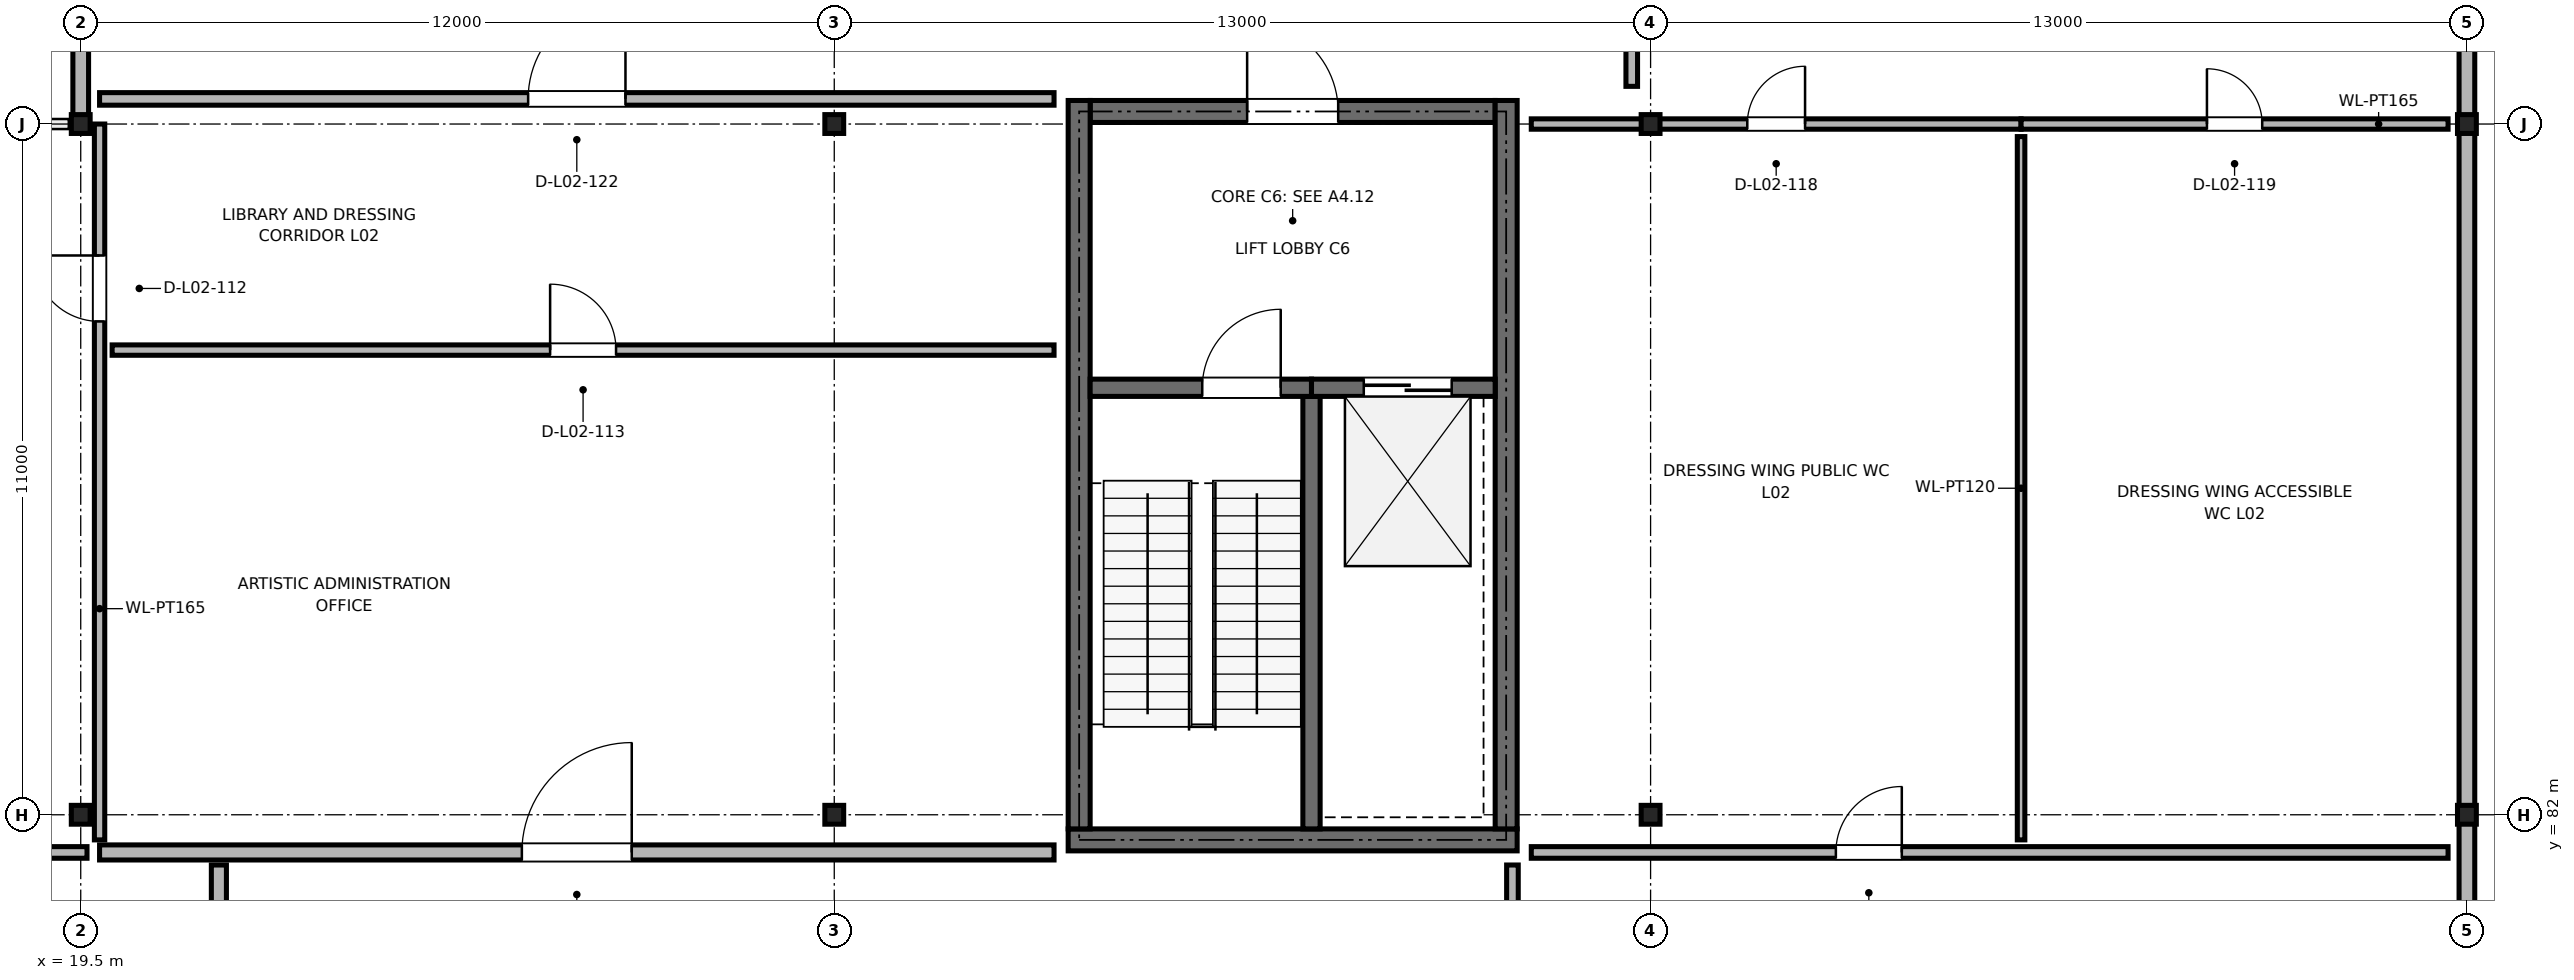
"""IFC4 building model, lengths in metres.
Left out: names, types, materials, properties, quantities, classifications, styles, units other than length and angle.
Written with IfcOpenShell. Run it as: python <this file> out.ifc"""

import sys

from ifc_helpers import new_model, si_unit, direction, frame, frame_2d, origin, origin_2d, place, context, subcontext, project, spatial, rectangle, i_section, extrude, element, fill, save


model = new_model("IFC4")
c1 = context("Model", 3, precision=1e-05, world=origin(), true_north=direction((0.0, 1.0)))
c2 = subcontext(c1, "Body", "Model", "MODEL_VIEW")
j1 = project(units=[si_unit("LENGTHUNIT", "METRE"), si_unit("PLANEANGLEUNIT", "RADIAN")], contexts=[c1])
p1 = place(None, origin())
s1 = spatial("IfcSite", under=j1, at=p1, CompositionType="ELEMENT")
p2 = place(p1, origin())
s2 = spatial("IfcBuilding", under=s1, at=p2, CompositionType="ELEMENT")
p3 = place(p2, frame((0.0, 0.0, 9.6)))
s3 = spatial("IfcBuildingStorey", under=s2, at=p3, CompositionType="ELEMENT", Elevation=9.6)
for number, where, z_axis, x_axis in (
    (1, (19.5, 82.0, 0.0), (0.0, 0.0, 1.0), (1.0, 0.0, 0.0)),
    (2, (19.5, 93.0, 0.0), (0.0, 0.0, 1.0), (1.0, 0.0, 0.0)),
    (3, (31.5, 82.0, 0.0), (0.0, 0.0, 1.0), (1.0, 0.0, 0.0)),
    (4, (31.5, 93.0, 0.0), (0.0, 0.0, 1.0), (1.0, 0.0, 0.0)),
    (5, (44.5, 82.0, 0.0), (0.0, 0.0, 1.0), (1.0, 0.0, 0.0)),
    (6, (44.5, 93.0, 0.0), (0.0, 0.0, 1.0), (1.0, 0.0, 0.0)),
    (7, (57.5, 82.0, 0.0), (0.0, 0.0, 1.0), (1.0, 0.0, 0.0)),
    (8, (57.5, 93.0, 0.0), (0.0, 0.0, 1.0), (1.0, 0.0, 0.0)),
):
    element("IfcColumn", number, at=place(p3, frame(where, z_axis=z_axis, x_axis=x_axis)), inside=s3, PredefinedType="COLUMN", context=c2, shape_type="SweptSolid", body=[
        extrude(i_section(OverallWidth=0.3, OverallDepth=0.3, WebThickness=0.011, FlangeThickness=0.019, FilletRadius=0.027, at=origin_2d()), origin(), (0.0, 0.0, 1.0), 4.8),
    ])
p4 = place(p3, frame((57.5, 81.98, 0.0), z_axis=(0.0, 0.0, 1.0), x_axis=(0.0, -1.0, 0.0)))
e9 = element("IfcWall", 9, at=p4, inside=s3, PredefinedType="SOLIDWALL", context=c2, shape_type="SweptSolid", body=[
    extrude(rectangle(XDim=10.96, YDim=0.25, at=frame_2d((5.48, 0.0))), origin(), (0.0, 0.0, 1.0), 4.028),
])
p5 = place(p4, frame((4.73, 0.0, 0.9)))
e10 = element("IfcOpeningElement", 10, at=p5, cuts=e9, PredefinedType="OPENING", context=c2, shape_type="SweptSolid", body=[
    extrude(rectangle(XDim=1.5, YDim=1.55, at=frame_2d((0.75, 0.775))), frame((0.0, 0.135, 0.0), z_axis=(0.0, -1.0, 0.0), x_axis=(1.0, 0.0, 0.0)), (0.0, 0.0, 1.0), 0.27),
])
p6 = place(p3, frame((57.5, 92.98, 0.0), z_axis=(0.0, 0.0, 1.0), x_axis=(0.0, -1.0, 0.0)))
e11 = element("IfcWall", 11, at=p6, inside=s3, PredefinedType="SOLIDWALL", context=c2, shape_type="SweptSolid", body=[
    extrude(rectangle(XDim=10.96, YDim=0.25, at=frame_2d((5.48, 0.0))), origin(), (0.0, 0.0, 1.0), 4.028),
])
p7 = place(p3, frame((57.5, 103.98, 0.0), z_axis=(0.0, 0.0, 1.0), x_axis=(0.0, -1.0, 0.0)))
e12 = element("IfcWall", 12, at=p7, inside=s3, PredefinedType="SOLIDWALL", context=c2, shape_type="SweptSolid", body=[
    extrude(rectangle(XDim=10.96, YDim=0.25, at=frame_2d((5.48, 0.0))), origin(), (0.0, 0.0, 1.0), 4.19),
])
p8 = place(p7, frame((4.655, 0.0, 0.9)))
e13 = element("IfcOpeningElement", 13, at=p8, cuts=e12, PredefinedType="OPENING", context=c2, shape_type="SweptSolid", body=[
    extrude(rectangle(XDim=1.65, YDim=1.55, at=frame_2d((0.825, 0.775))), frame((0.0, 0.135, 0.0), z_axis=(0.0, -1.0, 0.0), x_axis=(1.0, 0.0, 0.0)), (0.0, 0.0, 1.0), 0.27),
])
p9 = place(p3, frame((19.5, 93.02, 0.0), z_axis=(0.0, 0.0, 1.0), x_axis=(0.0, 1.0, 0.0)))
e14 = element("IfcWall", 14, at=p9, inside=s3, PredefinedType="SOLIDWALL", context=c2, shape_type="SweptSolid", body=[
    extrude(rectangle(XDim=10.96, YDim=0.25, at=frame_2d((5.48, 0.0))), origin(), (0.0, 0.0, 1.0), 4.088),
])
p10 = place(p9, frame((4.88, 0.0, 0.85)))
e15 = element("IfcOpeningElement", 15, at=p10, cuts=e14, PredefinedType="OPENING", context=c2, shape_type="SweptSolid", body=[
    extrude(rectangle(XDim=1.2, YDim=1.7, at=frame_2d((0.6, 0.85))), frame((0.0, 0.135, 0.0), z_axis=(0.0, -1.0, 0.0), x_axis=(1.0, 0.0, 0.0)), (0.0, 0.0, 1.0), 0.27),
])
p11 = place(p3, frame((35.225, 81.6, 0.0), z_axis=(0.0, 0.0, 1.0), x_axis=(1.0, 0.0, 0.0)))
e16 = element("IfcWall", 16, at=p11, inside=s3, PredefinedType="SHEAR", context=c2, shape_type="SweptSolid", body=[
    extrude(rectangle(XDim=7.15, YDim=0.35, at=frame_2d((3.575, 0.0))), origin(), (0.0, 0.0, 1.0), 4.55),
])
p12 = place(p3, frame((35.575, 93.2, 0.0), z_axis=(0.0, 0.0, 1.0), x_axis=(1.0, 0.0, 0.0)))
e17 = element("IfcWall", 17, at=p12, inside=s3, PredefinedType="SHEAR", context=c2, shape_type="SweptSolid", body=[
    extrude(rectangle(XDim=6.45, YDim=0.35, at=frame_2d((3.225, 0.0))), origin(), (0.0, 0.0, 1.0), 4.55),
])
p13 = place(p12, frame((2.5, 0.0, 0.0)))
e18 = element("IfcOpeningElement", 18, at=p13, cuts=e17, PredefinedType="OPENING", context=c2, shape_type="SweptSolid", body=[
    extrude(rectangle(XDim=1.45, YDim=2.2, at=frame_2d((0.725, 1.1))), frame((0.0, 0.185, 0.0), z_axis=(0.0, -1.0, 0.0), x_axis=(1.0, 0.0, 0.0)), (0.0, 0.0, 1.0), 0.37),
])
for number, where, z_axis, x_axis in (
    (19, (35.4, 81.775, 0.0), (0.0, 0.0, 1.0), (0.0, 1.0, 0.0)),
    (20, (42.2, 81.775, 0.0), (0.0, 0.0, 1.0), (0.0, 1.0, 0.0)),
):
    element("IfcWall", number, at=place(p3, frame(where, z_axis=z_axis, x_axis=x_axis)), inside=s3, PredefinedType="SHEAR", context=c2, shape_type="SweptSolid", body=[
        extrude(rectangle(XDim=11.6, YDim=0.35, at=frame_2d((5.8, 0.0))), origin(), (0.0, 0.0, 1.0), 4.55),
    ])
p14 = place(p3, frame((39.1, 81.775, 0.0), z_axis=(0.0, 0.0, 1.0), x_axis=(0.0, 1.0, 0.0)))
e21 = element("IfcWall", 21, at=p14, inside=s3, PredefinedType="SHEAR", context=c2, shape_type="SweptSolid", body=[
    extrude(rectangle(XDim=6.888, YDim=0.275, at=frame_2d((3.444, 0.0))), origin(), (0.0, 0.0, 1.0), 4.55),
])
p15 = place(p3, frame((35.575, 88.8, 0.0), z_axis=(0.0, 0.0, 1.0), x_axis=(1.0, 0.0, 0.0)))
e22 = element("IfcWall", 22, at=p15, inside=s3, PredefinedType="SHEAR", context=c2, shape_type="SweptSolid", body=[
    extrude(rectangle(XDim=3.525, YDim=0.275, at=frame_2d((1.763, 0.0))), origin(), (0.0, 0.0, 1.0), 4.55),
])
p16 = place(p15, frame((1.785, 0.0, 0.0)))
e23 = element("IfcOpeningElement", 23, at=p16, cuts=e22, PredefinedType="OPENING", context=c2, shape_type="SweptSolid", body=[
    extrude(rectangle(XDim=1.25, YDim=2.15, at=frame_2d((0.625, 1.075))), frame((0.0, 0.147, 0.0), z_axis=(0.0, -1.0, 0.0), x_axis=(1.0, 0.0, 0.0)), (0.0, 0.0, 1.0), 0.295),
])
p17 = place(p3, frame((39.1, 88.8, 0.0), z_axis=(0.0, 0.0, 1.0), x_axis=(1.0, 0.0, 0.0)))
e24 = element("IfcWall", 24, at=p17, inside=s3, PredefinedType="SHEAR", context=c2, shape_type="SweptSolid", body=[
    extrude(rectangle(XDim=2.925, YDim=0.275, at=frame_2d((1.462, 0.0))), origin(), (0.0, 0.0, 1.0), 4.55),
])
p18 = place(p17, frame((0.833, 0.0, 0.0)))
e25 = element("IfcOpeningElement", 25, at=p18, cuts=e24, PredefinedType="OPENING", context=c2, shape_type="SweptSolid", body=[
    extrude(rectangle(XDim=1.4, YDim=2.2, at=frame_2d((0.7, 1.1))), frame((0.0, 0.147, 0.0), z_axis=(0.0, -1.0, 0.0), x_axis=(1.0, 0.0, 0.0)), (0.0, 0.0, 1.0), 0.295),
])
p19 = place(p3, frame((19.8, 81.4, 0.0), z_axis=(0.0, 0.0, 1.0), x_axis=(1.0, 0.0, 0.0)))
e26 = element("IfcWall", 26, at=p19, inside=s3, PredefinedType="PARTITIONING", context=c2, shape_type="SweptSolid", body=[
    extrude(rectangle(XDim=15.2, YDim=0.24, at=frame_2d((7.6, 0.0))), origin(), (0.0, 0.0, 1.0), 3.89),
])
p20 = place(p19, frame((6.725, 0.0, 0.0)))
e27 = element("IfcOpeningElement", 27, at=p20, cuts=e26, PredefinedType="OPENING", context=c2, shape_type="SweptSolid", body=[
    extrude(rectangle(XDim=1.75, YDim=2.25, at=frame_2d((0.875, 1.125))), frame((0.0, 0.13, 0.0), z_axis=(0.0, -1.0, 0.0), x_axis=(1.0, 0.0, 0.0)), (0.0, 0.0, 1.0), 0.26),
])
p21 = place(p3, frame((7.8, 81.4, 0.0), z_axis=(0.0, 0.0, 1.0), x_axis=(1.0, 0.0, 0.0)))
e28 = element("IfcWall", 28, at=p21, inside=s3, PredefinedType="PARTITIONING", context=c2, shape_type="SweptSolid", body=[
    extrude(rectangle(XDim=11.8, YDim=0.185, at=frame_2d((5.9, 0.0))), origin(), (0.0, 0.0, 1.0), 4.09),
])
p22 = place(p21, frame((5.375, 0.0, 0.0)))
e29 = element("IfcOpeningElement", 29, at=p22, cuts=e28, PredefinedType="OPENING", context=c2, shape_type="SweptSolid", body=[
    extrude(rectangle(XDim=1.05, YDim=2.15, at=frame_2d((0.525, 1.075))), frame((0.0, 0.103, 0.0), z_axis=(0.0, -1.0, 0.0), x_axis=(1.0, 0.0, 0.0)), (0.0, 0.0, 1.0), 0.205),
])
p23 = place(p3, frame((19.8, 81.6, 0.0), z_axis=(0.0, 0.0, 1.0), x_axis=(0.0, 1.0, 0.0)))
e30 = element("IfcWall", 30, at=p23, inside=s3, PredefinedType="PARTITIONING", context=c2, shape_type="SweptSolid", body=[
    extrude(rectangle(XDim=11.4, YDim=0.165, at=frame_2d((5.7, 0.0))), origin(), (0.0, 0.0, 1.0), 4.09),
])
p24 = place(p23, frame((8.257, 0.0, 0.0)))
e31 = element("IfcOpeningElement", 31, at=p24, cuts=e30, PredefinedType="OPENING", context=c2, shape_type="SweptSolid", body=[
    extrude(rectangle(XDim=1.05, YDim=2.15, at=frame_2d((0.525, 1.075))), frame((0.0, 0.093, 0.0), z_axis=(0.0, -1.0, 0.0), x_axis=(1.0, 0.0, 0.0)), (0.0, 0.0, 1.0), 0.185),
])
p25 = place(p3, frame((20.0, 89.4, 0.0), z_axis=(0.0, 0.0, 1.0), x_axis=(1.0, 0.0, 0.0)))
e32 = element("IfcWall", 32, at=p25, inside=s3, PredefinedType="PARTITIONING", context=c2, shape_type="SweptSolid", body=[
    extrude(rectangle(XDim=15.0, YDim=0.165, at=frame_2d((7.5, 0.0))), origin(), (0.0, 0.0, 1.0), 4.09),
])
p26 = place(p25, frame((6.975, 0.0, 0.0)))
e33 = element("IfcOpeningElement", 33, at=p26, cuts=e32, PredefinedType="OPENING", context=c2, shape_type="SweptSolid", body=[
    extrude(rectangle(XDim=1.05, YDim=2.15, at=frame_2d((0.525, 1.075))), frame((0.0, 0.093, 0.0), z_axis=(0.0, -1.0, 0.0), x_axis=(1.0, 0.0, 0.0)), (0.0, 0.0, 1.0), 0.185),
])
p27 = place(p3, frame((21.7, 60.3, 0.0), z_axis=(0.0, 0.0, 1.0), x_axis=(0.0, 1.0, 0.0)))
e34 = element("IfcWall", 34, at=p27, inside=s3, PredefinedType="PARTITIONING", context=c2, shape_type="SweptSolid", body=[
    extrude(rectangle(XDim=20.9, YDim=0.24, at=frame_2d((10.45, 0.0))), origin(), (0.0, 0.0, 1.0), 3.74),
])
p28 = place(p27, frame((9.625, 0.0, 0.0)))
e35 = element("IfcOpeningElement", 35, at=p28, cuts=e34, PredefinedType="OPENING", context=c2, shape_type="SweptSolid", body=[
    extrude(rectangle(XDim=1.65, YDim=2.2, at=frame_2d((0.825, 1.1))), frame((0.0, 0.13, 0.0), z_axis=(0.0, -1.0, 0.0), x_axis=(1.0, 0.0, 0.0)), (0.0, 0.0, 1.0), 0.26),
])
p29 = place(p3, frame((42.3, 70.7, 0.0), z_axis=(0.0, 0.0, 1.0), x_axis=(0.0, 1.0, 0.0)))
e36 = element("IfcWall", 36, at=p29, inside=s3, PredefinedType="PARTITIONING", context=c2, shape_type="SweptSolid", body=[
    extrude(rectangle(XDim=10.5, YDim=0.185, at=frame_2d((5.25, 0.0))), origin(), (0.0, 0.0, 1.0), 3.74),
])
p30 = place(p29, frame((4.725, 0.0, 0.0)))
e37 = element("IfcOpeningElement", 37, at=p30, cuts=e36, PredefinedType="OPENING", context=c2, shape_type="SweptSolid", body=[
    extrude(rectangle(XDim=1.05, YDim=2.15, at=frame_2d((0.525, 1.075))), frame((0.0, 0.103, 0.0), z_axis=(0.0, -1.0, 0.0), x_axis=(1.0, 0.0, 0.0)), (0.0, 0.0, 1.0), 0.205),
])
p31 = place(p3, frame((42.6, 93.0, 0.0), z_axis=(0.0, 0.0, 1.0), x_axis=(1.0, 0.0, 0.0)))
e38 = element("IfcWall", 38, at=p31, inside=s3, PredefinedType="PARTITIONING", context=c2, shape_type="SweptSolid", body=[
    extrude(rectangle(XDim=7.8, YDim=0.165, at=frame_2d((3.9, 0.0))), origin(), (0.0, 0.0, 1.0), 4.09),
])
p32 = place(p31, frame((3.44, 0.0, 0.0)))
e39 = element("IfcOpeningElement", 39, at=p32, cuts=e38, PredefinedType="OPENING", context=c2, shape_type="SweptSolid", body=[
    extrude(rectangle(XDim=0.92, YDim=2.1, at=frame_2d((0.46, 1.05))), frame((0.0, 0.093, 0.0), z_axis=(0.0, -1.0, 0.0), x_axis=(1.0, 0.0, 0.0)), (0.0, 0.0, 1.0), 0.185),
])
p33 = place(p3, frame((50.4, 93.0, 0.0), z_axis=(0.0, 0.0, 1.0), x_axis=(1.0, 0.0, 0.0)))
e40 = element("IfcWall", 40, at=p33, inside=s3, PredefinedType="PARTITIONING", context=c2, shape_type="SweptSolid", body=[
    extrude(rectangle(XDim=6.8, YDim=0.165, at=frame_2d((3.4, 0.0))), origin(), (0.0, 0.0, 1.0), 4.544),
])
p34 = place(p33, frame((2.96, 0.0, 0.0)))
e41 = element("IfcOpeningElement", 41, at=p34, cuts=e40, PredefinedType="OPENING", context=c2, shape_type="SweptSolid", body=[
    extrude(rectangle(XDim=0.88, YDim=2.1, at=frame_2d((0.44, 1.05))), frame((0.0, 0.093, 0.0), z_axis=(0.0, -1.0, 0.0), x_axis=(1.0, 0.0, 0.0)), (0.0, 0.0, 1.0), 0.185),
])
p35 = place(p3, frame((50.4, 81.6, 0.0), z_axis=(0.0, 0.0, 1.0), x_axis=(0.0, 1.0, 0.0)))
e42 = element("IfcWall", 42, at=p35, inside=s3, PredefinedType="PARTITIONING", context=c2, shape_type="SweptSolid", body=[
    extrude(rectangle(XDim=11.2, YDim=0.12, at=frame_2d((5.6, 0.0))), origin(), (0.0, 0.0, 1.0), 4.03),
])
p36 = place(p3, frame((42.6, 81.4, 0.0), z_axis=(0.0, 0.0, 1.0), x_axis=(1.0, 0.0, 0.0)))
e43 = element("IfcWall", 43, at=p36, inside=s3, PredefinedType="PARTITIONING", context=c2, shape_type="SweptSolid", body=[
    extrude(rectangle(XDim=14.6, YDim=0.185, at=frame_2d((7.3, 0.0))), origin(), (0.0, 0.0, 1.0), 4.09),
])
p37 = place(p36, frame((4.851, 0.0, 0.0)))
e44 = element("IfcOpeningElement", 44, at=p37, cuts=e43, PredefinedType="OPENING", context=c2, shape_type="SweptSolid", body=[
    extrude(rectangle(XDim=1.05, YDim=2.15, at=frame_2d((0.525, 1.075))), frame((0.0, 0.103, 0.0), z_axis=(0.0, -1.0, 0.0), x_axis=(1.0, 0.0, 0.0)), (0.0, 0.0, 1.0), 0.205),
])
p38 = place(p3, frame((44.2, 93.6, 0.0), z_axis=(0.0, 0.0, 1.0), x_axis=(0.0, 1.0, 0.0)))
e45 = element("IfcWall", 45, at=p38, inside=s3, PredefinedType="PARTITIONING", context=c2, shape_type="SweptSolid", body=[
    extrude(rectangle(XDim=21.3, YDim=0.185, at=frame_2d((10.65, 0.0))), origin(), (0.0, 0.0, 1.0), 4.09),
])
p39 = place(p38, frame((5.23, 0.0, 0.0)))
e46 = element("IfcOpeningElement", 46, at=p39, cuts=e45, PredefinedType="OPENING", context=c2, shape_type="SweptSolid", body=[
    extrude(rectangle(XDim=1.1, YDim=2.15, at=frame_2d((0.55, 1.075))), frame((0.0, 0.103, 0.0), z_axis=(0.0, -1.0, 0.0), x_axis=(1.0, 0.0, 0.0)), (0.0, 0.0, 1.0), 0.205),
])
p40 = place(p3, frame((19.8, 93.4, 0.0), z_axis=(0.0, 0.0, 1.0), x_axis=(1.0, 0.0, 0.0)))
e47 = element("IfcWall", 47, at=p40, inside=s3, PredefinedType="PARTITIONING", context=c2, shape_type="SweptSolid", body=[
    extrude(rectangle(XDim=15.2, YDim=0.2, at=frame_2d((7.6, 0.0))), origin(), (0.0, 0.0, 1.0), 4.09),
])
p41 = place(p40, frame((6.825, 0.0, 0.0)))
e48 = element("IfcOpeningElement", 48, at=p41, cuts=e47, PredefinedType="OPENING", context=c2, shape_type="SweptSolid", body=[
    extrude(rectangle(XDim=1.55, YDim=2.18, at=frame_2d((0.775, 1.09))), frame((0.0, 0.11, 0.0), z_axis=(0.0, -1.0, 0.0), x_axis=(1.0, 0.0, 0.0)), (0.0, 0.0, 1.0), 0.22),
])
p42 = place(p16, origin())
e49 = element("IfcDoor", 49, at=p42, inside=s3, OperationType="SINGLE_SWING_RIGHT", PredefinedType="DOOR", context=c2, shape_type="SweptSolid", body=[
    extrude(rectangle(XDim=1.25, YDim=2.15, at=frame_2d((0.625, 1.075))), frame((0.0, 0.025, 0.0), z_axis=(0.0, -1.0, 0.0), x_axis=(1.0, 0.0, 0.0)), (0.0, 0.0, 1.0), 0.05),
])
fill(e23, e49)
p43 = place(p18, origin())
e50 = element("IfcDoor", 50, at=p43, inside=s3, OperationType="DOUBLE_DOOR_SLIDING", PredefinedType="DOOR", context=c2, shape_type="SweptSolid", body=[
    extrude(rectangle(XDim=1.4, YDim=2.2, at=frame_2d((0.7, 1.1))), frame((0.0, 0.025, 0.0), z_axis=(0.0, -1.0, 0.0), x_axis=(1.0, 0.0, 0.0)), (0.0, 0.0, 1.0), 0.05),
])
fill(e25, e50)
p44 = place(p13, origin())
e51 = element("IfcDoor", 51, at=p44, inside=s3, OperationType="SINGLE_SWING_LEFT", PredefinedType="DOOR", context=c2, shape_type="SweptSolid", body=[
    extrude(rectangle(XDim=1.45, YDim=2.2, at=frame_2d((0.725, 1.1))), frame((0.0, 0.025, 0.0), z_axis=(0.0, -1.0, 0.0), x_axis=(1.0, 0.0, 0.0)), (0.0, 0.0, 1.0), 0.05),
])
fill(e18, e51)
p45 = place(p20, origin())
e52 = element("IfcDoor", 52, at=p45, inside=s3, OperationType="SINGLE_SWING_RIGHT", PredefinedType="DOOR", context=c2, shape_type="SweptSolid", body=[
    extrude(rectangle(XDim=1.75, YDim=2.25, at=frame_2d((0.875, 1.125))), frame((0.0, 0.025, 0.0), z_axis=(0.0, -1.0, 0.0), x_axis=(1.0, 0.0, 0.0)), (0.0, 0.0, 1.0), 0.05),
])
fill(e27, e52)
p46 = place(p24, origin())
e53 = element("IfcDoor", 53, at=p46, inside=s3, OperationType="SINGLE_SWING_RIGHT", PredefinedType="DOOR", context=c2, shape_type="SweptSolid", body=[
    extrude(rectangle(XDim=1.05, YDim=2.15, at=frame_2d((0.525, 1.075))), frame((0.0, 0.025, 0.0), z_axis=(0.0, -1.0, 0.0), x_axis=(1.0, 0.0, 0.0)), (0.0, 0.0, 1.0), 0.05),
])
fill(e31, e53)
p47 = place(p26, origin())
e54 = element("IfcDoor", 54, at=p47, inside=s3, OperationType="SINGLE_SWING_LEFT", PredefinedType="DOOR", context=c2, shape_type="SweptSolid", body=[
    extrude(rectangle(XDim=1.05, YDim=2.15, at=frame_2d((0.525, 1.075))), frame((0.0, 0.025, 0.0), z_axis=(0.0, -1.0, 0.0), x_axis=(1.0, 0.0, 0.0)), (0.0, 0.0, 1.0), 0.05),
])
fill(e33, e54)
p48 = place(p32, origin())
e55 = element("IfcDoor", 55, at=p48, inside=s3, OperationType="SINGLE_SWING_RIGHT", PredefinedType="DOOR", context=c2, shape_type="SweptSolid", body=[
    extrude(rectangle(XDim=0.92, YDim=2.1, at=frame_2d((0.46, 1.05))), frame((0.0, 0.025, 0.0), z_axis=(0.0, -1.0, 0.0), x_axis=(1.0, 0.0, 0.0)), (0.0, 0.0, 1.0), 0.05),
])
fill(e39, e55)
p49 = place(p34, origin())
e56 = element("IfcDoor", 56, at=p49, inside=s3, OperationType="SINGLE_SWING_LEFT", PredefinedType="DOOR", context=c2, shape_type="SweptSolid", body=[
    extrude(rectangle(XDim=0.88, YDim=2.1, at=frame_2d((0.44, 1.05))), frame((0.0, 0.025, 0.0), z_axis=(0.0, -1.0, 0.0), x_axis=(1.0, 0.0, 0.0)), (0.0, 0.0, 1.0), 0.05),
])
fill(e41, e56)
p50 = place(p37, origin())
e57 = element("IfcDoor", 57, at=p50, inside=s3, OperationType="SINGLE_SWING_RIGHT", PredefinedType="DOOR", context=c2, shape_type="SweptSolid", body=[
    extrude(rectangle(XDim=1.05, YDim=2.15, at=frame_2d((0.525, 1.075))), frame((0.0, 0.025, 0.0), z_axis=(0.0, -1.0, 0.0), x_axis=(1.0, 0.0, 0.0)), (0.0, 0.0, 1.0), 0.05),
])
fill(e44, e57)
p51 = place(p41, origin())
e58 = element("IfcDoor", 58, at=p51, inside=s3, OperationType="SINGLE_SWING_RIGHT", PredefinedType="DOOR", context=c2, shape_type="SweptSolid", body=[
    extrude(rectangle(XDim=1.55, YDim=2.18, at=frame_2d((0.775, 1.09))), frame((0.0, 0.025, 0.0), z_axis=(0.0, -1.0, 0.0), x_axis=(1.0, 0.0, 0.0)), (0.0, 0.0, 1.0), 0.05),
])
fill(e48, e58)
save(model, sys.argv[1])
